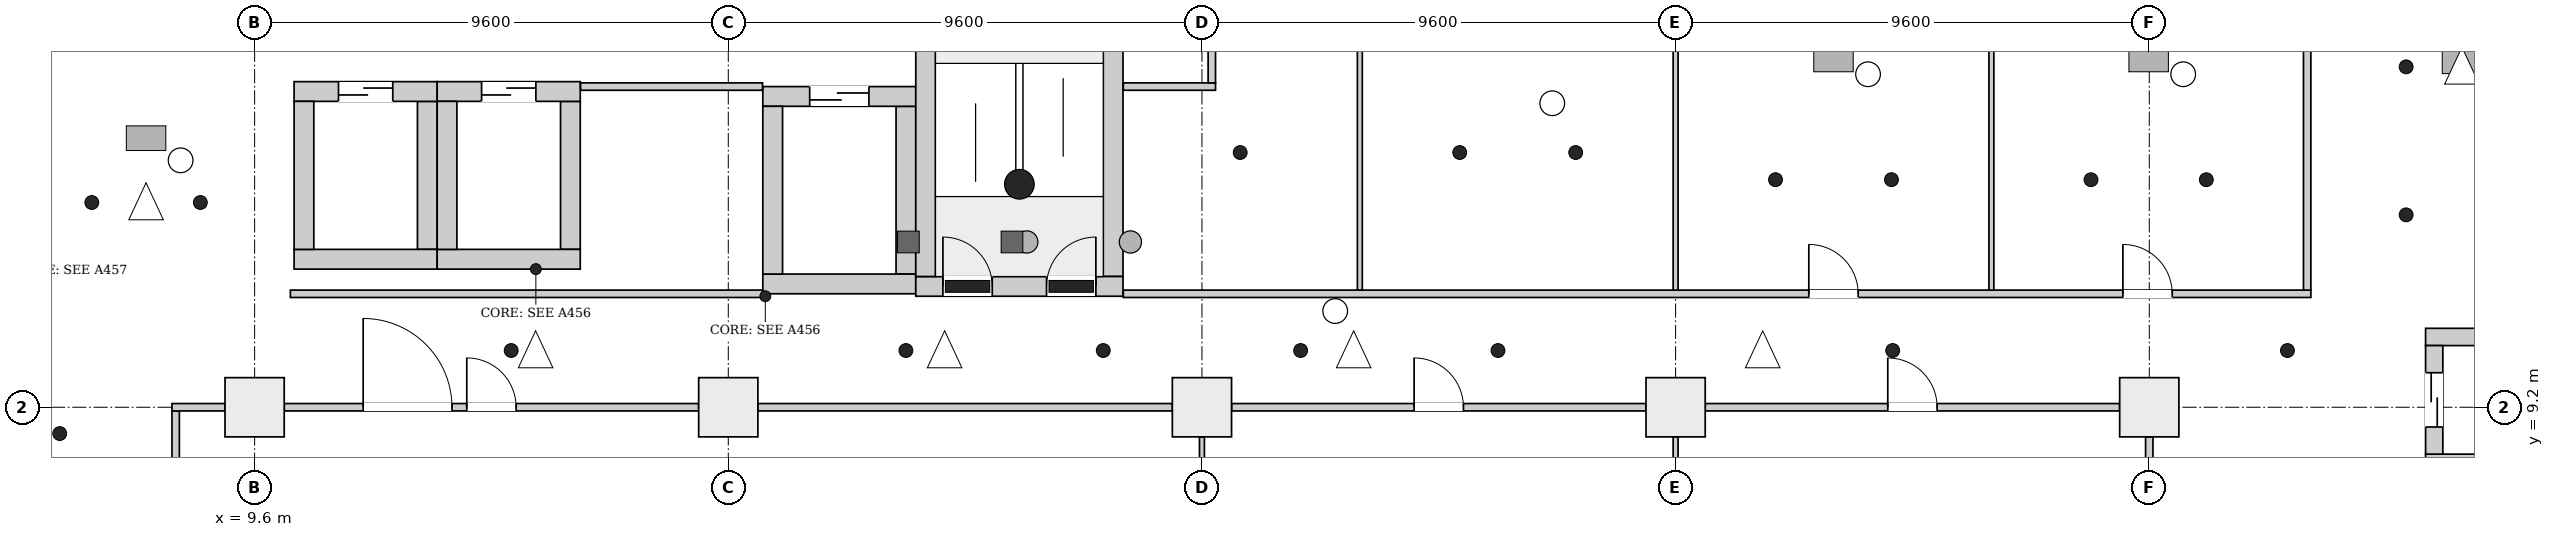
"""IFC4 building model, lengths in metres.
Left out: names, types, materials, properties, quantities, classifications, styles, units other than length and angle.
Written with IfcOpenShell. Run it as: python <this file> out.ifc"""

import sys

from ifc_helpers import new_model, si_unit, direction, frame, frame_2d, origin, origin_2d, place, context, subcontext, project, spatial, rectangle, extrude, element, fill, save


model = new_model("IFC4")
c1 = context("Model", 3, precision=1e-05, world=origin(), true_north=direction((0.0, 1.0)))
c2 = subcontext(c1, "Body", "Model", "MODEL_VIEW")
j1 = project(units=[si_unit("LENGTHUNIT", "METRE"), si_unit("PLANEANGLEUNIT", "RADIAN")], contexts=[c1])
p1 = place(None, origin())
s1 = spatial("IfcSite", under=j1, at=p1, CompositionType="ELEMENT")
p2 = place(p1, origin())
s2 = spatial("IfcBuilding", under=s1, at=p2, CompositionType="ELEMENT")
p3 = place(p2, frame((0.0, 0.0, 21.7)))
s3 = spatial("IfcBuildingStorey", under=s2, at=p3, CompositionType="ELEMENT", Elevation=21.7)
p4 = place(p3, frame((23.0, 11.65, 0.0), z_axis=(0.0, 0.0, 1.0), x_axis=(1.0, 0.0, 0.0)))
e1 = element("IfcWall", 1, at=p4, inside=s3, PredefinedType="SHEAR", context=c2, shape_type="SweptSolid", body=[
    extrude(rectangle(XDim=4.2, YDim=0.4, at=frame_2d((2.1, 0.0))), origin(), (0.0, 0.0, 1.0), 5.0),
])
p5 = place(p4, frame((0.55, 0.0, 0.0)))
e2 = element("IfcOpeningElement", 2, at=p5, cuts=e1, PredefinedType="OPENING", context=c2, shape_type="SweptSolid", body=[
    extrude(rectangle(XDim=1.0, YDim=2.1, at=frame_2d((0.5, 1.05))), frame((0.0, 0.21, 0.0), z_axis=(0.0, -1.0, 0.0), x_axis=(1.0, 0.0, 0.0)), (0.0, 0.0, 1.0), 0.42),
])
p6 = place(p4, frame((2.65, 0.0, 0.0)))
e3 = element("IfcOpeningElement", 3, at=p6, cuts=e1, PredefinedType="OPENING", context=c2, shape_type="SweptSolid", body=[
    extrude(rectangle(XDim=1.0, YDim=2.1, at=frame_2d((0.5, 1.05))), frame((0.0, 0.21, 0.0), z_axis=(0.0, -1.0, 0.0), x_axis=(1.0, 0.0, 0.0)), (0.0, 0.0, 1.0), 0.42),
])
for number, where, z_axis, x_axis in (
    (4, (23.2, 11.85, 0.0), (0.0, 0.0, 1.0), (0.0, 1.0, 0.0)),
    (5, (27.0, 11.85, 0.0), (0.0, 0.0, 1.0), (0.0, 1.0, 0.0)),
):
    element("IfcWall", number, at=place(p3, frame(where, z_axis=z_axis, x_axis=x_axis)), inside=s3, PredefinedType="SHEAR", context=c2, shape_type="SweptSolid", body=[
        extrude(rectangle(XDim=6.6, YDim=0.4, at=frame_2d((3.3, 0.0))), origin(), (0.0, 0.0, 1.0), 5.0),
    ])
for number, where, z_axis, x_axis in (
    (6, (53.6, 8.075, 0.0), (0.0, 0.0, 1.0), (1.0, 0.0, 0.0)),
    (7, (53.6, 10.625, 0.0), (0.0, 0.0, 1.0), (1.0, 0.0, 0.0)),
):
    element("IfcWall", number, at=place(p3, frame(where, z_axis=z_axis, x_axis=x_axis)), inside=s3, PredefinedType="SHEAR", context=c2, shape_type="SweptSolid", body=[
        extrude(rectangle(XDim=3.8, YDim=0.35, at=frame_2d((1.9, 0.0))), origin(), (0.0, 0.0, 1.0), 5.0),
    ])
p7 = place(p3, frame((53.775, 8.25, 0.0), z_axis=(0.0, 0.0, 1.0), x_axis=(0.0, 1.0, 0.0)))
e8 = element("IfcWall", 8, at=p7, inside=s3, PredefinedType="SHEAR", context=c2, shape_type="SweptSolid", body=[
    extrude(rectangle(XDim=2.2, YDim=0.35, at=frame_2d((1.1, 0.0))), origin(), (0.0, 0.0, 1.0), 5.0),
])
p8 = place(p7, frame((0.55, 0.0, 0.0)))
e9 = element("IfcOpeningElement", 9, at=p8, cuts=e8, PredefinedType="OPENING", context=c2, shape_type="SweptSolid", body=[
    extrude(rectangle(XDim=1.1, YDim=2.1, at=frame_2d((0.55, 1.05))), frame((0.0, 0.185, 0.0), z_axis=(0.0, -1.0, 0.0), x_axis=(1.0, 0.0, 0.0)), (0.0, 0.0, 1.0), 0.37),
])
p9 = place(p3, frame((10.4, 12.2, 0.0), z_axis=(0.0, 0.0, 1.0), x_axis=(1.0, 0.0, 0.0)))
e10 = element("IfcWall", 10, at=p9, inside=s3, PredefinedType="SHEAR", context=c2, shape_type="SweptSolid", body=[
    extrude(rectangle(XDim=2.9, YDim=0.4, at=frame_2d((1.45, 0.0))), origin(), (0.0, 0.0, 1.0), 5.0),
])
p10 = place(p3, frame((10.4, 15.6, 0.0), z_axis=(0.0, 0.0, 1.0), x_axis=(1.0, 0.0, 0.0)))
e11 = element("IfcWall", 11, at=p10, inside=s3, PredefinedType="SHEAR", context=c2, shape_type="SweptSolid", body=[
    extrude(rectangle(XDim=2.9, YDim=0.4, at=frame_2d((1.45, 0.0))), origin(), (0.0, 0.0, 1.0), 5.0),
])
p11 = place(p10, frame((0.9, 0.0, 0.0)))
e12 = element("IfcOpeningElement", 12, at=p11, cuts=e11, PredefinedType="OPENING", context=c2, shape_type="SweptSolid", body=[
    extrude(rectangle(XDim=1.1, YDim=2.1, at=frame_2d((0.55, 1.05))), frame((0.0, 0.21, 0.0), z_axis=(0.0, -1.0, 0.0), x_axis=(1.0, 0.0, 0.0)), (0.0, 0.0, 1.0), 0.42),
])
for number, where, z_axis, x_axis in (
    (13, (10.6, 12.4, 0.0), (0.0, 0.0, 1.0), (0.0, 1.0, 0.0)),
    (14, (13.1, 12.4, 0.0), (0.0, 0.0, 1.0), (0.0, 1.0, 0.0)),
):
    element("IfcWall", number, at=place(p3, frame(where, z_axis=z_axis, x_axis=x_axis)), inside=s3, PredefinedType="SHEAR", context=c2, shape_type="SweptSolid", body=[
        extrude(rectangle(XDim=3.0, YDim=0.4, at=frame_2d((1.5, 0.0))), origin(), (0.0, 0.0, 1.0), 5.0),
    ])
p12 = place(p3, frame((13.3, 12.2, 0.0), z_axis=(0.0, 0.0, 1.0), x_axis=(1.0, 0.0, 0.0)))
e15 = element("IfcWall", 15, at=p12, inside=s3, PredefinedType="SHEAR", context=c2, shape_type="SweptSolid", body=[
    extrude(rectangle(XDim=2.9, YDim=0.4, at=frame_2d((1.45, 0.0))), origin(), (0.0, 0.0, 1.0), 5.0),
])
p13 = place(p3, frame((13.3, 15.6, 0.0), z_axis=(0.0, 0.0, 1.0), x_axis=(1.0, 0.0, 0.0)))
e16 = element("IfcWall", 16, at=p13, inside=s3, PredefinedType="SHEAR", context=c2, shape_type="SweptSolid", body=[
    extrude(rectangle(XDim=2.9, YDim=0.4, at=frame_2d((1.45, 0.0))), origin(), (0.0, 0.0, 1.0), 5.0),
])
p14 = place(p13, frame((0.9, 0.0, 0.0)))
e17 = element("IfcOpeningElement", 17, at=p14, cuts=e16, PredefinedType="OPENING", context=c2, shape_type="SweptSolid", body=[
    extrude(rectangle(XDim=1.1, YDim=2.1, at=frame_2d((0.55, 1.05))), frame((0.0, 0.21, 0.0), z_axis=(0.0, -1.0, 0.0), x_axis=(1.0, 0.0, 0.0)), (0.0, 0.0, 1.0), 0.42),
])
for number, where, z_axis, x_axis in (
    (18, (13.5, 12.4, 0.0), (0.0, 0.0, 1.0), (0.0, 1.0, 0.0)),
    (19, (16.0, 12.4, 0.0), (0.0, 0.0, 1.0), (0.0, 1.0, 0.0)),
):
    element("IfcWall", number, at=place(p3, frame(where, z_axis=z_axis, x_axis=x_axis)), inside=s3, PredefinedType="SHEAR", context=c2, shape_type="SweptSolid", body=[
        extrude(rectangle(XDim=3.0, YDim=0.4, at=frame_2d((1.5, 0.0))), origin(), (0.0, 0.0, 1.0), 5.0),
    ])
p15 = place(p3, frame((19.9, 11.7, 0.0), z_axis=(0.0, 0.0, 1.0), x_axis=(1.0, 0.0, 0.0)))
e20 = element("IfcWall", 20, at=p15, inside=s3, PredefinedType="SHEAR", context=c2, shape_type="SweptSolid", body=[
    extrude(rectangle(XDim=3.1, YDim=0.4, at=frame_2d((1.55, 0.0))), origin(), (0.0, 0.0, 1.0), 5.0),
])
p16 = place(p3, frame((19.9, 15.5, 0.0), z_axis=(0.0, 0.0, 1.0), x_axis=(1.0, 0.0, 0.0)))
e21 = element("IfcWall", 21, at=p16, inside=s3, PredefinedType="SHEAR", context=c2, shape_type="SweptSolid", body=[
    extrude(rectangle(XDim=3.1, YDim=0.4, at=frame_2d((1.55, 0.0))), origin(), (0.0, 0.0, 1.0), 5.0),
])
p17 = place(p16, frame((0.95, 0.0, 0.0)))
e22 = element("IfcOpeningElement", 22, at=p17, cuts=e21, PredefinedType="OPENING", context=c2, shape_type="SweptSolid", body=[
    extrude(rectangle(XDim=1.2, YDim=2.1, at=frame_2d((0.6, 1.05))), frame((0.0, 0.21, 0.0), z_axis=(0.0, -1.0, 0.0), x_axis=(1.0, 0.0, 0.0)), (0.0, 0.0, 1.0), 0.42),
])
for number, where, z_axis, x_axis in (
    (23, (20.1, 11.9, 0.0), (0.0, 0.0, 1.0), (0.0, 1.0, 0.0)),
    (24, (22.8, 11.9, 0.0), (0.0, 0.0, 1.0), (0.0, 1.0, 0.0)),
):
    element("IfcWall", number, at=place(p3, frame(where, z_axis=z_axis, x_axis=x_axis)), inside=s3, PredefinedType="SHEAR", context=c2, shape_type="SweptSolid", body=[
        extrude(rectangle(XDim=3.4, YDim=0.4, at=frame_2d((1.7, 0.0))), origin(), (0.0, 0.0, 1.0), 5.0),
    ])
for number, where, z_axis, x_axis in (
    (25, (9.6, 9.2, 0.0), (0.0, 0.0, 1.0), (1.0, 0.0, 0.0)),
    (26, (19.2, 9.2, 0.0), (0.0, 0.0, 1.0), (1.0, 0.0, 0.0)),
    (27, (28.8, 9.2, 0.0), (0.0, 0.0, 1.0), (1.0, 0.0, 0.0)),
    (28, (38.4, 9.2, 0.0), (0.0, 0.0, 1.0), (1.0, 0.0, 0.0)),
    (29, (48.0, 9.2, 0.0), (0.0, 0.0, 1.0), (1.0, 0.0, 0.0)),
):
    element("IfcColumn", number, at=place(p3, frame(where, z_axis=z_axis, x_axis=x_axis)), inside=s3, PredefinedType="COLUMN", context=c2, shape_type="SweptSolid", body=[
        extrude(rectangle(XDim=1.2, YDim=1.2, at=origin_2d()), origin(), (0.0, 0.0, 1.0), 5.0),
    ])
p18 = place(p3, frame((8.0, 0.206, 0.0), z_axis=(0.0, 0.0, 1.0), x_axis=(0.0, 1.0, 0.0)))
e30 = element("IfcWall", 30, at=p18, inside=s3, PredefinedType="PARTITIONING", context=c2, shape_type="SweptSolid", body=[
    extrude(rectangle(XDim=8.919, YDim=0.15, at=frame_2d((4.459, 0.0))), origin(), (0.0, 0.0, 1.0), 4.65),
])
p19 = place(p3, frame((7.925, 9.2, 0.0), z_axis=(0.0, 0.0, 1.0), x_axis=(1.0, 0.0, 0.0)))
e31 = element("IfcWall", 31, at=p19, inside=s3, PredefinedType="PARTITIONING", context=c2, shape_type="SweptSolid", body=[
    extrude(rectangle(XDim=1.075, YDim=0.15, at=frame_2d((0.538, 0.0))), origin(), (0.0, 0.0, 1.0), 4.25),
])
p20 = place(p3, frame((10.2, 9.2, 0.0), z_axis=(0.0, 0.0, 1.0), x_axis=(1.0, 0.0, 0.0)))
e32 = element("IfcWall", 32, at=p20, inside=s3, PredefinedType="PARTITIONING", context=c2, shape_type="SweptSolid", body=[
    extrude(rectangle(XDim=8.4, YDim=0.15, at=frame_2d((4.2, 0.0))), origin(), (0.0, 0.0, 1.0), 4.25),
])
p21 = place(p20, frame((3.7, 0.0, 0.0)))
e33 = element("IfcOpeningElement", 33, at=p21, cuts=e32, PredefinedType="OPENING", context=c2, shape_type="SweptSolid", body=[
    extrude(rectangle(XDim=1.0, YDim=2.1, at=frame_2d((0.5, 1.05))), frame((0.0, 0.085, 0.0), z_axis=(0.0, -1.0, 0.0), x_axis=(1.0, 0.0, 0.0)), (0.0, 0.0, 1.0), 0.17),
])
p22 = place(p20, frame((1.6, 0.0, 0.0)))
e34 = element("IfcOpeningElement", 34, at=p22, cuts=e32, PredefinedType="OPENING", context=c2, shape_type="SweptSolid", body=[
    extrude(rectangle(XDim=1.8, YDim=2.1, at=frame_2d((0.9, 1.05))), frame((0.0, 0.085, 0.0), z_axis=(0.0, -1.0, 0.0), x_axis=(1.0, 0.0, 0.0)), (0.0, 0.0, 1.0), 0.17),
])
p23 = place(p3, frame((10.325, 11.5, 0.0), z_axis=(0.0, 0.0, 1.0), x_axis=(1.0, 0.0, 0.0)))
e35 = element("IfcWall", 35, at=p23, inside=s3, PredefinedType="PARTITIONING", context=c2, shape_type="SweptSolid", body=[
    extrude(rectangle(XDim=9.569, YDim=0.15, at=frame_2d((4.785, 0.0))), origin(), (0.0, 0.0, 1.0), 4.65),
])
p24 = place(p3, frame((16.206, 15.7, 0.0), z_axis=(0.0, 0.0, 1.0), x_axis=(1.0, 0.0, 0.0)))
e36 = element("IfcWall", 36, at=p24, inside=s3, PredefinedType="PARTITIONING", context=c2, shape_type="SweptSolid", body=[
    extrude(rectangle(XDim=3.688, YDim=0.15, at=frame_2d((1.844, 0.0))), origin(), (0.0, 0.0, 1.0), 4.65),
])
p25 = place(p3, frame((19.8, 9.2, 0.0), z_axis=(0.0, 0.0, 1.0), x_axis=(1.0, 0.0, 0.0)))
e37 = element("IfcWall", 37, at=p25, inside=s3, PredefinedType="PARTITIONING", context=c2, shape_type="SweptSolid", body=[
    extrude(rectangle(XDim=8.4, YDim=0.15, at=frame_2d((4.2, 0.0))), origin(), (0.0, 0.0, 1.0), 4.25),
])
p26 = place(p3, frame((27.206, 11.5, 0.0), z_axis=(0.0, 0.0, 1.0), x_axis=(1.0, 0.0, 0.0)))
e38 = element("IfcWall", 38, at=p26, inside=s3, PredefinedType="PARTITIONING", context=c2, shape_type="SweptSolid", body=[
    extrude(rectangle(XDim=24.069, YDim=0.15, at=frame_2d((12.034, 0.0))), origin(), (0.0, 0.0, 1.0), 4.65),
])
p27 = place(p26, frame((13.894, 0.0, 0.0)))
e39 = element("IfcOpeningElement", 39, at=p27, cuts=e38, PredefinedType="OPENING", context=c2, shape_type="SweptSolid", body=[
    extrude(rectangle(XDim=1.0, YDim=2.1, at=frame_2d((0.5, 1.05))), frame((0.0, 0.085, 0.0), z_axis=(0.0, -1.0, 0.0), x_axis=(1.0, 0.0, 0.0)), (0.0, 0.0, 1.0), 0.17),
])
p28 = place(p26, frame((20.259, 0.0, 0.0)))
e40 = element("IfcOpeningElement", 40, at=p28, cuts=e38, PredefinedType="OPENING", context=c2, shape_type="SweptSolid", body=[
    extrude(rectangle(XDim=1.0, YDim=2.1, at=frame_2d((0.5, 1.05))), frame((0.0, 0.085, 0.0), z_axis=(0.0, -1.0, 0.0), x_axis=(1.0, 0.0, 0.0)), (0.0, 0.0, 1.0), 0.17),
])
p29 = place(p3, frame((27.206, 15.7, 0.0), z_axis=(0.0, 0.0, 1.0), x_axis=(1.0, 0.0, 0.0)))
e41 = element("IfcWall", 41, at=p29, inside=s3, PredefinedType="PARTITIONING", context=c2, shape_type="SweptSolid", body=[
    extrude(rectangle(XDim=1.869, YDim=0.15, at=frame_2d((0.935, 0.0))), origin(), (0.0, 0.0, 1.0), 4.65),
])
p30 = place(p3, frame((28.8, 1.05, 0.0), z_axis=(0.0, 0.0, 1.0), x_axis=(0.0, 1.0, 0.0)))
e42 = element("IfcWall", 42, at=p30, inside=s3, PredefinedType="PARTITIONING", context=c2, shape_type="SweptSolid", body=[
    extrude(rectangle(XDim=7.55, YDim=0.1, at=frame_2d((3.775, 0.0))), origin(), (0.0, 0.0, 1.0), 4.25),
])
p31 = place(p3, frame((29.0, 15.775, 0.0), z_axis=(0.0, 0.0, 1.0), x_axis=(0.0, 1.0, 0.0)))
e43 = element("IfcWall", 43, at=p31, inside=s3, PredefinedType="PARTITIONING", context=c2, shape_type="SweptSolid", body=[
    extrude(rectangle(XDim=2.025, YDim=0.15, at=frame_2d((1.013, 0.0))), origin(), (0.0, 0.0, 1.0), 4.25),
])
p32 = place(p3, frame((29.4, 9.2, 0.0), z_axis=(0.0, 0.0, 1.0), x_axis=(1.0, 0.0, 0.0)))
e44 = element("IfcWall", 44, at=p32, inside=s3, PredefinedType="PARTITIONING", context=c2, shape_type="SweptSolid", body=[
    extrude(rectangle(XDim=8.4, YDim=0.15, at=frame_2d((4.2, 0.0))), origin(), (0.0, 0.0, 1.0), 4.25),
])
p33 = place(p32, frame((3.7, 0.0, 0.0)))
e45 = element("IfcOpeningElement", 45, at=p33, cuts=e44, PredefinedType="OPENING", context=c2, shape_type="SweptSolid", body=[
    extrude(rectangle(XDim=1.0, YDim=2.1, at=frame_2d((0.5, 1.05))), frame((0.0, 0.085, 0.0), z_axis=(0.0, -1.0, 0.0), x_axis=(1.0, 0.0, 0.0)), (0.0, 0.0, 1.0), 0.17),
])
p34 = place(p3, frame((32.0, 11.575, 0.0), z_axis=(0.0, 0.0, 1.0), x_axis=(0.0, 1.0, 0.0)))
e46 = element("IfcWall", 46, at=p34, inside=s3, PredefinedType="PARTITIONING", context=c2, shape_type="SweptSolid", body=[
    extrude(rectangle(XDim=9.55, YDim=0.1, at=frame_2d((4.775, 0.0))), origin(), (0.0, 0.0, 1.0), 4.65),
])
p35 = place(p3, frame((38.4, 1.05, 0.0), z_axis=(0.0, 0.0, 1.0), x_axis=(0.0, 1.0, 0.0)))
e47 = element("IfcWall", 47, at=p35, inside=s3, PredefinedType="PARTITIONING", context=c2, shape_type="SweptSolid", body=[
    extrude(rectangle(XDim=7.55, YDim=0.1, at=frame_2d((3.775, 0.0))), origin(), (0.0, 0.0, 1.0), 4.25),
])
p36 = place(p3, frame((38.4, 11.575, 0.0), z_axis=(0.0, 0.0, 1.0), x_axis=(0.0, 1.0, 0.0)))
e48 = element("IfcWall", 48, at=p36, inside=s3, PredefinedType="PARTITIONING", context=c2, shape_type="SweptSolid", body=[
    extrude(rectangle(XDim=6.225, YDim=0.1, at=frame_2d((3.113, 0.0))), origin(), (0.0, 0.0, 1.0), 4.25),
])
p37 = place(p3, frame((39.0, 9.2, 0.0), z_axis=(0.0, 0.0, 1.0), x_axis=(1.0, 0.0, 0.0)))
e49 = element("IfcWall", 49, at=p37, inside=s3, PredefinedType="PARTITIONING", context=c2, shape_type="SweptSolid", body=[
    extrude(rectangle(XDim=8.4, YDim=0.15, at=frame_2d((4.2, 0.0))), origin(), (0.0, 0.0, 1.0), 4.25),
])
p38 = place(p37, frame((3.7, 0.0, 0.0)))
e50 = element("IfcOpeningElement", 50, at=p38, cuts=e49, PredefinedType="OPENING", context=c2, shape_type="SweptSolid", body=[
    extrude(rectangle(XDim=1.0, YDim=2.1, at=frame_2d((0.5, 1.05))), frame((0.0, 0.085, 0.0), z_axis=(0.0, -1.0, 0.0), x_axis=(1.0, 0.0, 0.0)), (0.0, 0.0, 1.0), 0.17),
])
p39 = place(p3, frame((44.8, 11.575, 0.0), z_axis=(0.0, 0.0, 1.0), x_axis=(0.0, 1.0, 0.0)))
e51 = element("IfcWall", 51, at=p39, inside=s3, PredefinedType="PARTITIONING", context=c2, shape_type="SweptSolid", body=[
    extrude(rectangle(XDim=7.35, YDim=0.1, at=frame_2d((3.675, 0.0))), origin(), (0.0, 0.0, 1.0), 4.65),
])
p40 = place(p3, frame((48.0, 1.05, 0.0), z_axis=(0.0, 0.0, 1.0), x_axis=(0.0, 1.0, 0.0)))
e52 = element("IfcWall", 52, at=p40, inside=s3, PredefinedType="PARTITIONING", context=c2, shape_type="SweptSolid", body=[
    extrude(rectangle(XDim=7.55, YDim=0.15, at=frame_2d((3.775, 0.0))), origin(), (0.0, 0.0, 1.0), 4.25),
])
p41 = place(p3, frame((51.2, 11.575, 0.0), z_axis=(0.0, 0.0, 1.0), x_axis=(0.0, 1.0, 0.0)))
e53 = element("IfcWall", 53, at=p41, inside=s3, PredefinedType="PARTITIONING", context=c2, shape_type="SweptSolid", body=[
    extrude(rectangle(XDim=7.35, YDim=0.15, at=frame_2d((3.675, 0.0))), origin(), (0.0, 0.0, 1.0), 4.65),
])
p42 = place(p5, origin())
e54 = element("IfcDoor", 54, at=p42, inside=s3, OperationType="SINGLE_SWING_RIGHT", PredefinedType="DOOR", context=c2, shape_type="SweptSolid", body=[
    extrude(rectangle(XDim=1.0, YDim=2.1, at=frame_2d((0.5, 1.05))), frame((0.0, 0.025, 0.0), z_axis=(0.0, -1.0, 0.0), x_axis=(1.0, 0.0, 0.0)), (0.0, 0.0, 1.0), 0.05),
])
fill(e2, e54)
p43 = place(p6, origin())
e55 = element("IfcDoor", 55, at=p43, inside=s3, OperationType="SINGLE_SWING_LEFT", PredefinedType="DOOR", context=c2, shape_type="SweptSolid", body=[
    extrude(rectangle(XDim=1.0, YDim=2.1, at=frame_2d((0.5, 1.05))), frame((0.0, 0.025, 0.0), z_axis=(0.0, -1.0, 0.0), x_axis=(1.0, 0.0, 0.0)), (0.0, 0.0, 1.0), 0.05),
])
fill(e3, e55)
p44 = place(p8, origin())
e56 = element("IfcDoor", 56, at=p44, inside=s3, OperationType="DOUBLE_DOOR_SLIDING", PredefinedType="DOOR", context=c2, shape_type="SweptSolid", body=[
    extrude(rectangle(XDim=1.1, YDim=2.1, at=frame_2d((0.55, 1.05))), frame((0.0, 0.025, 0.0), z_axis=(0.0, -1.0, 0.0), x_axis=(1.0, 0.0, 0.0)), (0.0, 0.0, 1.0), 0.05),
])
fill(e9, e56)
p45 = place(p11, origin())
e57 = element("IfcDoor", 57, at=p45, inside=s3, OperationType="DOUBLE_DOOR_SLIDING", PredefinedType="DOOR", context=c2, shape_type="SweptSolid", body=[
    extrude(rectangle(XDim=1.1, YDim=2.1, at=frame_2d((0.55, 1.05))), frame((0.0, 0.025, 0.0), z_axis=(0.0, -1.0, 0.0), x_axis=(1.0, 0.0, 0.0)), (0.0, 0.0, 1.0), 0.05),
])
fill(e12, e57)
p46 = place(p14, origin())
e58 = element("IfcDoor", 58, at=p46, inside=s3, OperationType="DOUBLE_DOOR_SLIDING", PredefinedType="DOOR", context=c2, shape_type="SweptSolid", body=[
    extrude(rectangle(XDim=1.1, YDim=2.1, at=frame_2d((0.55, 1.05))), frame((0.0, 0.025, 0.0), z_axis=(0.0, -1.0, 0.0), x_axis=(1.0, 0.0, 0.0)), (0.0, 0.0, 1.0), 0.05),
])
fill(e17, e58)
p47 = place(p17, origin())
e59 = element("IfcDoor", 59, at=p47, inside=s3, OperationType="DOUBLE_DOOR_SLIDING", PredefinedType="DOOR", context=c2, shape_type="SweptSolid", body=[
    extrude(rectangle(XDim=1.2, YDim=2.1, at=frame_2d((0.6, 1.05))), frame((0.0, 0.025, 0.0), z_axis=(0.0, -1.0, 0.0), x_axis=(1.0, 0.0, 0.0)), (0.0, 0.0, 1.0), 0.05),
])
fill(e22, e59)
p48 = place(p27, origin())
e60 = element("IfcDoor", 60, at=p48, inside=s3, OperationType="SINGLE_SWING_RIGHT", PredefinedType="DOOR", context=c2, shape_type="SweptSolid", body=[
    extrude(rectangle(XDim=1.0, YDim=2.1, at=frame_2d((0.5, 1.05))), frame((0.0, 0.025, 0.0), z_axis=(0.0, -1.0, 0.0), x_axis=(1.0, 0.0, 0.0)), (0.0, 0.0, 1.0), 0.05),
])
fill(e39, e60)
p49 = place(p28, origin())
e61 = element("IfcDoor", 61, at=p49, inside=s3, OperationType="SINGLE_SWING_RIGHT", PredefinedType="DOOR", context=c2, shape_type="SweptSolid", body=[
    extrude(rectangle(XDim=1.0, YDim=2.1, at=frame_2d((0.5, 1.05))), frame((0.0, 0.025, 0.0), z_axis=(0.0, -1.0, 0.0), x_axis=(1.0, 0.0, 0.0)), (0.0, 0.0, 1.0), 0.05),
])
fill(e40, e61)
p50 = place(p21, origin())
e62 = element("IfcDoor", 62, at=p50, inside=s3, OperationType="SINGLE_SWING_LEFT", PredefinedType="DOOR", context=c2, shape_type="SweptSolid", body=[
    extrude(rectangle(XDim=1.0, YDim=2.1, at=frame_2d((0.5, 1.05))), frame((0.0, 0.025, 0.0), z_axis=(0.0, -1.0, 0.0), x_axis=(1.0, 0.0, 0.0)), (0.0, 0.0, 1.0), 0.05),
])
fill(e33, e62)
p51 = place(p33, origin())
e63 = element("IfcDoor", 63, at=p51, inside=s3, OperationType="SINGLE_SWING_LEFT", PredefinedType="DOOR", context=c2, shape_type="SweptSolid", body=[
    extrude(rectangle(XDim=1.0, YDim=2.1, at=frame_2d((0.5, 1.05))), frame((0.0, 0.025, 0.0), z_axis=(0.0, -1.0, 0.0), x_axis=(1.0, 0.0, 0.0)), (0.0, 0.0, 1.0), 0.05),
])
fill(e45, e63)
p52 = place(p38, origin())
e64 = element("IfcDoor", 64, at=p52, inside=s3, OperationType="SINGLE_SWING_LEFT", PredefinedType="DOOR", context=c2, shape_type="SweptSolid", body=[
    extrude(rectangle(XDim=1.0, YDim=2.1, at=frame_2d((0.5, 1.05))), frame((0.0, 0.025, 0.0), z_axis=(0.0, -1.0, 0.0), x_axis=(1.0, 0.0, 0.0)), (0.0, 0.0, 1.0), 0.05),
])
fill(e50, e64)
p53 = place(p22, origin())
e65 = element("IfcDoor", 65, at=p53, inside=s3, OperationType="DOUBLE_DOOR_SINGLE_SWING", PredefinedType="DOOR", context=c2, shape_type="SweptSolid", body=[
    extrude(rectangle(XDim=1.8, YDim=2.1, at=frame_2d((0.9, 1.05))), frame((0.0, 0.025, 0.0), z_axis=(0.0, -1.0, 0.0), x_axis=(1.0, 0.0, 0.0)), (0.0, 0.0, 1.0), 0.05),
])
fill(e34, e65)
save(model, sys.argv[1])
